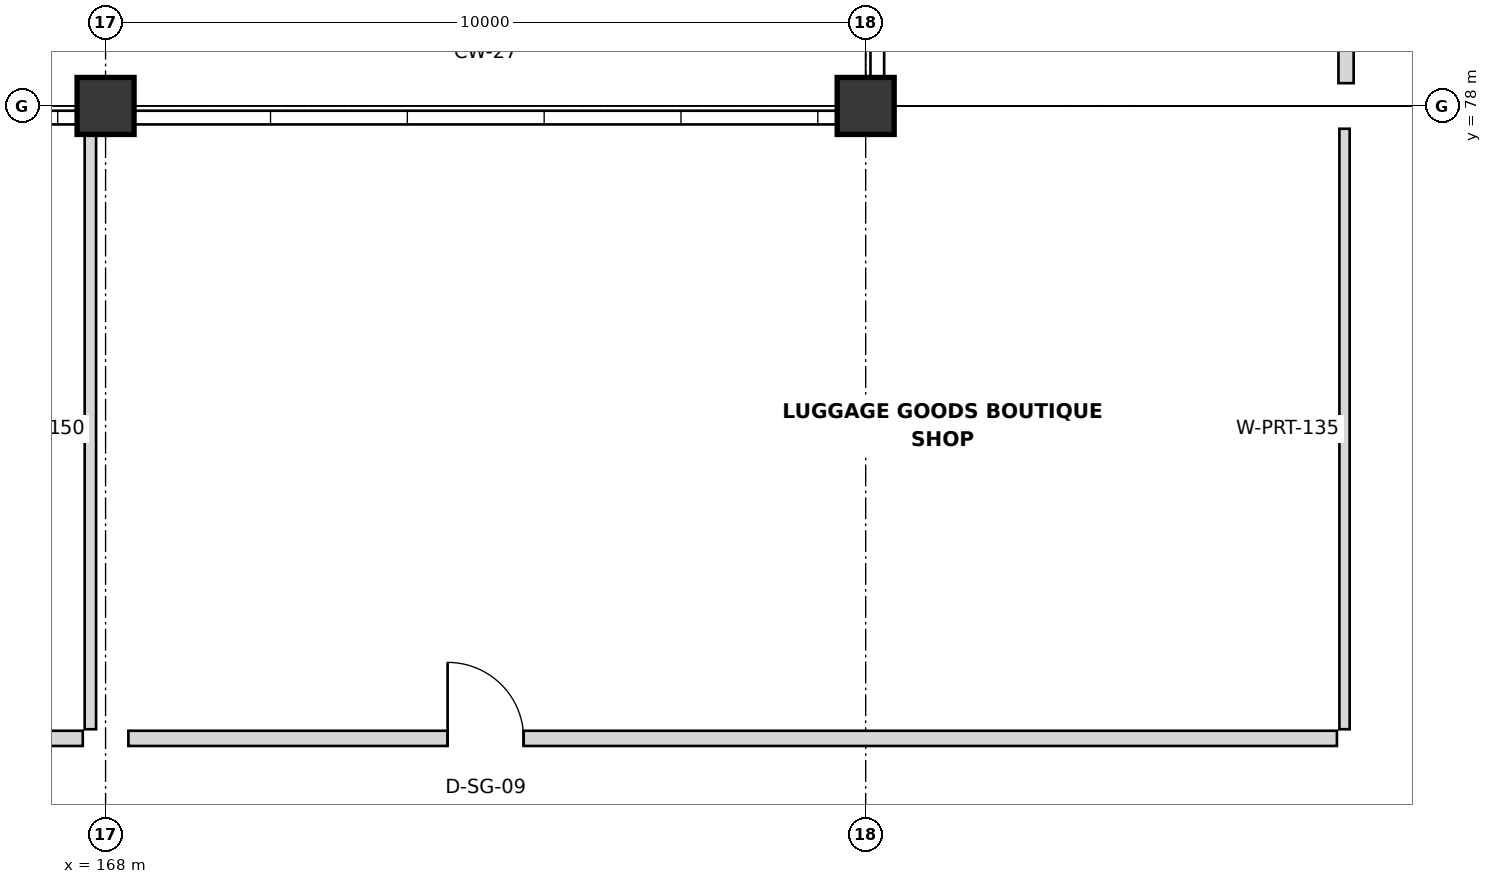
"""IFC4 building model, lengths in metres.
Left out: names, types, materials, properties, quantities, classifications, styles, units other than length and angle.
Written with IfcOpenShell. Run it as: python <this file> out.ifc"""

import sys

from ifc_helpers import new_model, si_unit, direction, frame, frame_2d, origin, origin_2d, place, context, subcontext, project, spatial, rectangle, extrude, element, fill, save


model = new_model("IFC4")
c1 = context("Model", 3, precision=1e-05, world=origin(), true_north=direction((0.0, 1.0)))
c2 = subcontext(c1, "Body", "Model", "MODEL_VIEW")
j1 = project(units=[si_unit("LENGTHUNIT", "METRE"), si_unit("PLANEANGLEUNIT", "RADIAN")], contexts=[c1])
p1 = place(None, origin())
s1 = spatial("IfcSite", under=j1, at=p1, CompositionType="ELEMENT")
p2 = place(p1, origin())
s2 = spatial("IfcBuilding", under=s1, at=p2, CompositionType="ELEMENT")
p3 = place(p2, frame((0.0, 0.0, 9.6)))
s3 = spatial("IfcBuildingStorey", under=s2, at=p3, CompositionType="ELEMENT", Elevation=9.6)
for number, where, z_axis, x_axis in (
    (1, (168.0, 78.0, 0.0), (0.0, 0.0, 1.0), (1.0, 0.0, 0.0)),
    (2, (178.0, 78.0, 0.0), (0.0, 0.0, 1.0), (1.0, 0.0, 0.0)),
):
    element("IfcColumn", number, at=place(p3, frame(where, z_axis=z_axis, x_axis=x_axis)), inside=s3, PredefinedType="COLUMN", context=c2, shape_type="SweptSolid", body=[
        extrude(rectangle(XDim=0.75, YDim=0.75, at=origin_2d()), origin(), (0.0, 0.0, 1.0), 4.8),
    ])
p4 = place(p3, frame((184.32, 78.3, 0.0), z_axis=(0.0, 0.0, 1.0), x_axis=(0.0, 1.0, 0.0)))
e3 = element("IfcWall", 3, at=p4, inside=s3, PredefinedType="PARTITIONING", context=c2, shape_type="SweptSolid", body=[
    extrude(rectangle(XDim=17.4, YDim=0.2, at=frame_2d((8.7, 0.0))), origin(), (0.0, 0.0, 1.0), 3.658),
])
p5 = place(p4, frame((5.225, 0.0, 0.0)))
e4 = element("IfcOpeningElement", 4, at=p5, cuts=e3, PredefinedType="OPENING", context=c2, shape_type="SweptSolid", body=[
    extrude(rectangle(XDim=0.95, YDim=2.1, at=frame_2d((0.475, 1.05))), frame((0.0, 0.11, 0.0), z_axis=(0.0, -1.0, 0.0), x_axis=(1.0, 0.0, 0.0)), (0.0, 0.0, 1.0), 0.22),
])
p6 = place(p3, frame((131.8, 69.68, 0.0), z_axis=(0.0, 0.0, 1.0), x_axis=(1.0, 0.0, 0.0)))
e5 = element("IfcWall", 5, at=p6, inside=s3, PredefinedType="PARTITIONING", context=c2, shape_type="SweptSolid", body=[
    extrude(rectangle(XDim=35.9, YDim=0.2, at=frame_2d((17.95, 0.0))), origin(), (0.0, 0.0, 1.0), 3.758),
])
p7 = place(p6, frame((20.725, 0.0, 0.0)))
e6 = element("IfcOpeningElement", 6, at=p7, cuts=e5, PredefinedType="OPENING", context=c2, shape_type="SweptSolid", body=[
    extrude(rectangle(XDim=0.95, YDim=2.2, at=frame_2d((0.475, 1.1))), frame((0.0, 0.11, 0.0), z_axis=(0.0, -1.0, 0.0), x_axis=(1.0, 0.0, 0.0)), (0.0, 0.0, 1.0), 0.22),
])
p8 = place(p3, frame((167.8, 69.8, 0.0), z_axis=(0.0, 0.0, 1.0), x_axis=(0.0, 1.0, 0.0)))
e7 = element("IfcWall", 7, at=p8, inside=s3, PredefinedType="PARTITIONING", context=c2, shape_type="SweptSolid", body=[
    extrude(rectangle(XDim=7.9, YDim=0.15, at=frame_2d((3.95, 0.0))), origin(), (0.0, 0.0, 1.0), 3.658),
])
p9 = place(p3, frame((168.3, 69.68, 0.0), z_axis=(0.0, 0.0, 1.0), x_axis=(1.0, 0.0, 0.0)))
e8 = element("IfcWall", 8, at=p9, inside=s3, PredefinedType="PARTITIONING", context=c2, shape_type="SweptSolid", body=[
    extrude(rectangle(XDim=15.9, YDim=0.2, at=frame_2d((7.95, 0.0))), origin(), (0.0, 0.0, 1.0), 3.758),
])
p10 = place(p9, frame((4.2, 0.0, 0.0)))
e9 = element("IfcOpeningElement", 9, at=p10, cuts=e8, PredefinedType="OPENING", context=c2, shape_type="SweptSolid", body=[
    extrude(rectangle(XDim=1.0, YDim=2.2, at=frame_2d((0.5, 1.1))), frame((0.0, 0.11, 0.0), z_axis=(0.0, -1.0, 0.0), x_axis=(1.0, 0.0, 0.0)), (0.0, 0.0, 1.0), 0.22),
])
p11 = place(p3, frame((184.3, 69.8, 0.0), z_axis=(0.0, 0.0, 1.0), x_axis=(0.0, 1.0, 0.0)))
e10 = element("IfcWall", 10, at=p11, inside=s3, PredefinedType="PARTITIONING", context=c2, shape_type="SweptSolid", body=[
    extrude(rectangle(XDim=7.9, YDim=0.135, at=frame_2d((3.95, 0.0))), origin(), (0.0, 0.0, 1.0), 3.658),
])
p12 = place(p10, origin())
e11 = element("IfcDoor", 11, at=p12, inside=s3, OperationType="SINGLE_SWING_LEFT", PredefinedType="DOOR", context=c2, shape_type="SweptSolid", body=[
    extrude(rectangle(XDim=1.0, YDim=2.2, at=frame_2d((0.5, 1.1))), frame((0.0, 0.025, 0.0), z_axis=(0.0, -1.0, 0.0), x_axis=(1.0, 0.0, 0.0)), (0.0, 0.0, 1.0), 0.05),
])
fill(e9, e11)
save(model, sys.argv[1])
